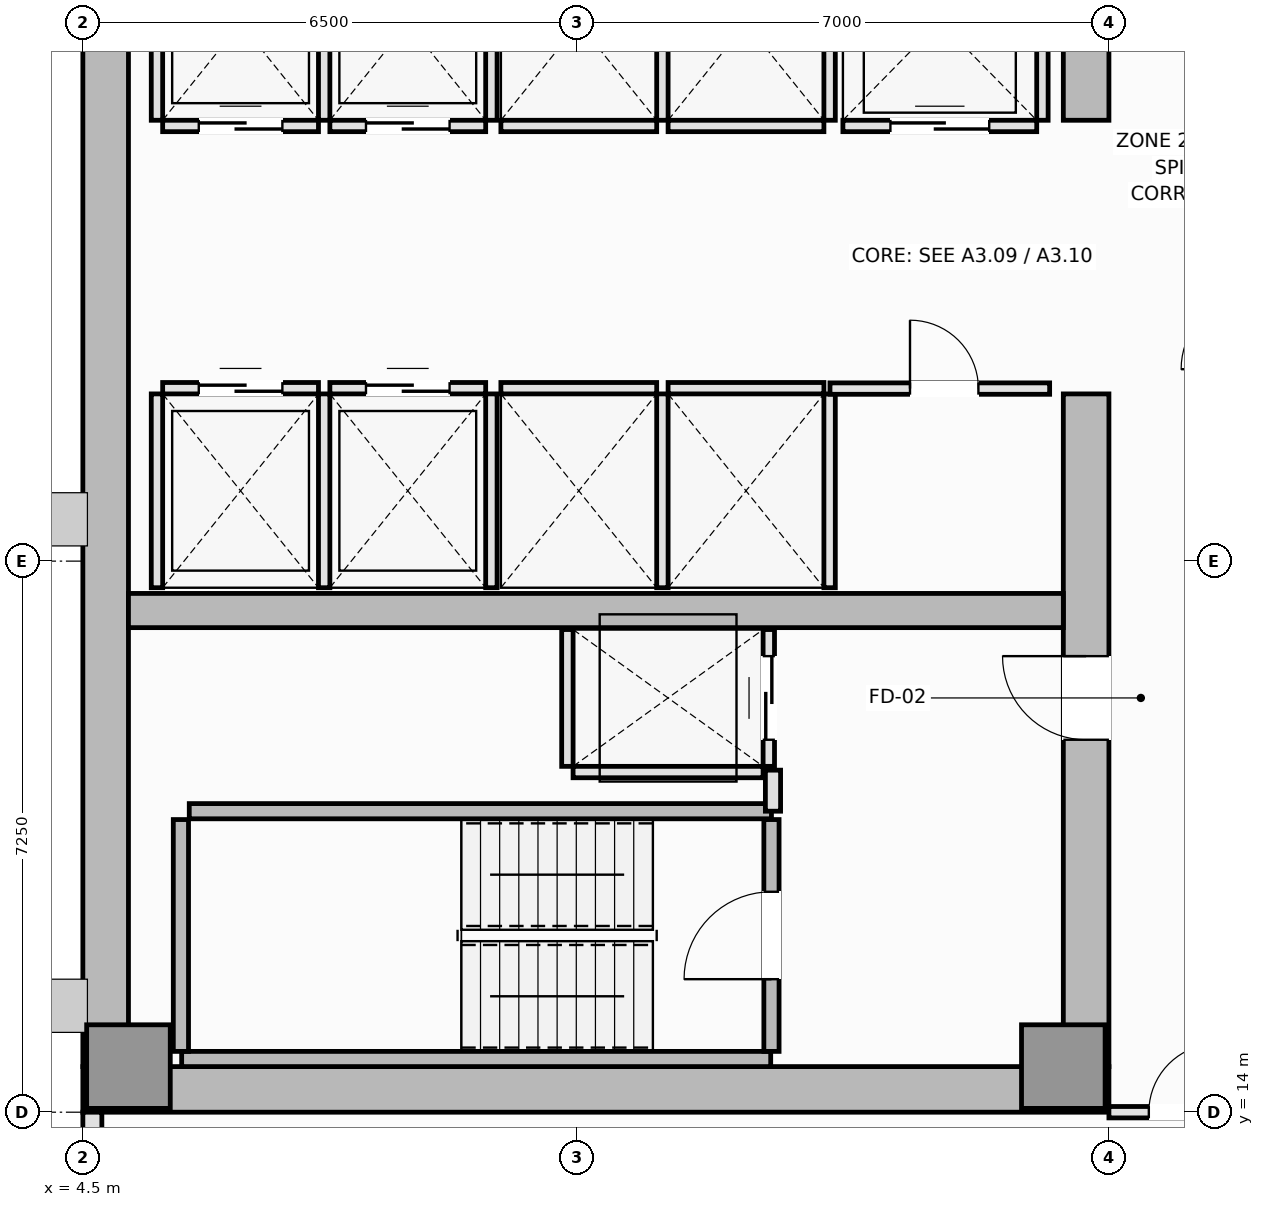
"""IFC4 building model, lengths in metres.
Left out: names, types, materials, properties, quantities, classifications, styles, units other than length and angle.
Written with IfcOpenShell. Run it as: python <this file> out.ifc"""

import sys

from ifc_helpers import new_model, si_unit, direction, frame, frame_2d, origin, origin_2d, place, context, subcontext, project, spatial, rectangle, extrude, element, fill, save


model = new_model("IFC4")
c1 = context("Model", 3, precision=1e-05, world=origin(), true_north=direction((0.0, 1.0)))
c2 = subcontext(c1, "Body", "Model", "MODEL_VIEW")
j1 = project(units=[si_unit("LENGTHUNIT", "METRE"), si_unit("PLANEANGLEUNIT", "RADIAN")], contexts=[c1])
p1 = place(None, origin())
s1 = spatial("IfcSite", under=j1, at=p1, CompositionType="ELEMENT")
p2 = place(p1, origin())
s2 = spatial("IfcBuilding", under=s1, at=p2, CompositionType="ELEMENT")
p3 = place(p2, frame((0.0, 0.0, 148.4)))
s3 = spatial("IfcBuildingStorey", under=s2, at=p3, CompositionType="ELEMENT", Elevation=148.4)
p4 = place(p3, frame((4.5, 14.3, 0.0), z_axis=(0.0, 0.0, 1.0), x_axis=(1.0, 0.0, 0.0)))
e1 = element("IfcWall", 1, at=p4, inside=s3, PredefinedType="SHEAR", context=c2, shape_type="SweptSolid", body=[
    extrude(rectangle(XDim=13.5, YDim=0.6, at=frame_2d((6.75, 0.0))), origin(), (0.0, 0.0, 1.0), 3.55),
])
p5 = place(p3, frame((4.8, 14.6, 0.0), z_axis=(0.0, 0.0, 1.0), x_axis=(0.0, 1.0, 0.0)))
e2 = element("IfcWall", 2, at=p5, inside=s3, PredefinedType="SHEAR", context=c2, shape_type="SweptSolid", body=[
    extrude(rectangle(XDim=21.3, YDim=0.6, at=frame_2d((10.65, 0.0))), origin(), (0.0, 0.0, 1.0), 3.55),
])
p6 = place(p3, frame((17.7, 14.6, 0.0), z_axis=(0.0, 0.0, 1.0), x_axis=(0.0, 1.0, 0.0)))
e3 = element("IfcWall", 3, at=p6, inside=s3, PredefinedType="SHEAR", context=c2, shape_type="SweptSolid", body=[
    extrude(rectangle(XDim=8.85, YDim=0.6, at=frame_2d((4.425, 0.0))), origin(), (0.0, 0.0, 1.0), 3.55),
])
p7 = place(p6, frame((4.3, 0.0, 0.0)))
e4 = element("IfcOpeningElement", 4, at=p7, cuts=e3, PredefinedType="OPENING", context=c2, shape_type="SweptSolid", body=[
    extrude(rectangle(XDim=1.1, YDim=2.15, at=frame_2d((0.55, 1.075))), frame((0.0, 0.31, 0.0), z_axis=(0.0, -1.0, 0.0), x_axis=(1.0, 0.0, 0.0)), (0.0, 0.0, 1.0), 0.62),
])
p8 = place(p3, frame((17.7, 27.05, 0.0), z_axis=(0.0, 0.0, 1.0), x_axis=(0.0, 1.0, 0.0)))
e5 = element("IfcWall", 5, at=p8, inside=s3, PredefinedType="SHEAR", context=c2, shape_type="SweptSolid", body=[
    extrude(rectangle(XDim=8.85, YDim=0.6, at=frame_2d((4.425, 0.0))), origin(), (0.0, 0.0, 1.0), 3.55),
])
p9 = place(p8, frame((3.45, 0.0, 0.0)))
e6 = element("IfcOpeningElement", 6, at=p9, cuts=e5, PredefinedType="OPENING", context=c2, shape_type="SweptSolid", body=[
    extrude(rectangle(XDim=1.1, YDim=2.15, at=frame_2d((0.55, 1.075))), frame((0.0, 0.31, 0.0), z_axis=(0.0, -1.0, 0.0), x_axis=(1.0, 0.0, 0.0)), (0.0, 0.0, 1.0), 0.62),
])
p10 = place(p3, frame((5.1, 20.6, 0.0), z_axis=(0.0, 0.0, 1.0), x_axis=(1.0, 0.0, 0.0)))
e7 = element("IfcWall", 7, at=p10, inside=s3, PredefinedType="SHEAR", context=c2, shape_type="SweptSolid", body=[
    extrude(rectangle(XDim=12.3, YDim=0.45, at=frame_2d((6.15, 0.0))), origin(), (0.0, 0.0, 1.0), 3.55),
])
for number, where, z_axis, x_axis in (
    (8, (5.1, 14.6, 0.0), (0.0, 0.0, 1.0), (1.0, 0.0, 0.0)),
    (9, (17.4, 14.6, 0.0), (0.0, 0.0, 1.0), (1.0, 0.0, 0.0)),
):
    element("IfcColumn", number, at=place(p3, frame(where, z_axis=z_axis, x_axis=x_axis)), inside=s3, PredefinedType="PILASTER", context=c2, shape_type="SweptSolid", body=[
        extrude(rectangle(XDim=1.1, YDim=1.1, at=origin_2d()), origin(), (0.0, 0.0, 1.0), 3.55),
    ])
p11 = place(p3, frame((4.625, 14.0, 0.0), z_axis=(0.0, 0.0, 1.0), x_axis=(0.0, -1.0, 0.0)))
e10 = element("IfcWall", 10, at=p11, inside=s3, PredefinedType="SOLIDWALL", context=c2, shape_type="SweptSolid", body=[
    extrude(rectangle(XDim=6.0, YDim=0.25, at=frame_2d((3.0, 0.0))), origin(), (0.0, 0.0, 1.0), 3.37),
])
p12 = place(p11, frame((1.9, 0.0, 0.9)))
e11 = element("IfcOpeningElement", 11, at=p12, cuts=e10, PredefinedType="OPENING", context=c2, shape_type="SweptSolid", body=[
    extrude(rectangle(XDim=2.2, YDim=1.8, at=frame_2d((1.1, 0.9))), frame((0.0, 0.135, 0.0), z_axis=(0.0, -1.0, 0.0), x_axis=(1.0, 0.0, 0.0)), (0.0, 0.0, 1.0), 0.27),
])
p13 = place(p3, frame((5.8, 14.7, 0.0), z_axis=(0.0, 0.0, 1.0), x_axis=(1.0, 0.0, 0.0)))
e12 = element("IfcWall", 12, at=p13, inside=s3, PredefinedType="SOLIDWALL", context=c2, shape_type="SweptSolid", body=[
    extrude(rectangle(XDim=7.75, YDim=0.2, at=frame_2d((3.875, 0.0))), origin(), (0.0, 0.0, 1.0), 3.55),
])
p14 = place(p3, frame((5.79, 14.8, 0.0), z_axis=(0.0, 0.0, 1.0), x_axis=(0.0, 1.0, 0.0)))
e13 = element("IfcWall", 13, at=p14, inside=s3, PredefinedType="SOLIDWALL", context=c2, shape_type="SweptSolid", body=[
    extrude(rectangle(XDim=3.05, YDim=0.2, at=frame_2d((1.525, 0.0))), origin(), (0.0, 0.0, 1.0), 3.55),
])
p15 = place(p3, frame((5.9, 17.96, 0.0), z_axis=(0.0, 0.0, 1.0), x_axis=(1.0, 0.0, 0.0)))
e14 = element("IfcWall", 14, at=p15, inside=s3, PredefinedType="SOLIDWALL", context=c2, shape_type="SweptSolid", body=[
    extrude(rectangle(XDim=7.66, YDim=0.2, at=frame_2d((3.83, 0.0))), origin(), (0.0, 0.0, 1.0), 3.55),
])
p16 = place(p3, frame((13.56, 14.8, 0.0), z_axis=(0.0, 0.0, 1.0), x_axis=(0.0, 1.0, 0.0)))
e15 = element("IfcWall", 15, at=p16, inside=s3, PredefinedType="SOLIDWALL", context=c2, shape_type="SweptSolid", body=[
    extrude(rectangle(XDim=3.05, YDim=0.2, at=frame_2d((1.525, 0.0))), origin(), (0.0, 0.0, 1.0), 3.55),
])
p17 = place(p16, frame((0.95, 0.0, 0.0)))
e16 = element("IfcOpeningElement", 16, at=p17, cuts=e15, PredefinedType="OPENING", context=c2, shape_type="SweptSolid", body=[
    extrude(rectangle(XDim=1.15, YDim=2.15, at=frame_2d((0.575, 1.075))), frame((0.0, 0.11, 0.0), z_axis=(0.0, -1.0, 0.0), x_axis=(1.0, 0.0, 0.0)), (0.0, 0.0, 1.0), 0.22),
])
p18 = place(p3, frame((5.55, 23.525, 0.0), z_axis=(0.0, 0.0, 1.0), x_axis=(1.0, 0.0, 0.0)))
e17 = element("IfcWall", 17, at=p18, inside=s3, PredefinedType="PARTITIONING", context=c2, shape_type="SweptSolid", body=[
    extrude(rectangle(XDim=2.05, YDim=0.15, at=frame_2d((1.025, 0.0))), origin(), (0.0, 0.0, 1.0), 3.37),
])
p19 = place(p18, frame((0.475, 0.0, 0.0)))
e18 = element("IfcOpeningElement", 18, at=p19, cuts=e17, PredefinedType="OPENING", context=c2, shape_type="SweptSolid", body=[
    extrude(rectangle(XDim=1.1, YDim=2.2, at=frame_2d((0.55, 1.1))), frame((0.0, 0.085, 0.0), z_axis=(0.0, -1.0, 0.0), x_axis=(1.0, 0.0, 0.0)), (0.0, 0.0, 1.0), 0.17),
])
for number, where, z_axis, x_axis in (
    (19, (5.475, 20.9, 0.0), (0.0, 0.0, 1.0), (0.0, 1.0, 0.0)),
    (20, (7.675, 20.9, 0.0), (0.0, 0.0, 1.0), (0.0, 1.0, 0.0)),
):
    element("IfcWall", number, at=place(p3, frame(where, z_axis=z_axis, x_axis=x_axis)), inside=s3, PredefinedType="PARTITIONING", context=c2, shape_type="SweptSolid", body=[
        extrude(rectangle(XDim=2.55, YDim=0.15, at=frame_2d((1.275, 0.0))), origin(), (0.0, 0.0, 1.0), 3.37),
    ])
p20 = place(p3, frame((7.75, 23.525, 0.0), z_axis=(0.0, 0.0, 1.0), x_axis=(1.0, 0.0, 0.0)))
e21 = element("IfcWall", 21, at=p20, inside=s3, PredefinedType="PARTITIONING", context=c2, shape_type="SweptSolid", body=[
    extrude(rectangle(XDim=2.05, YDim=0.15, at=frame_2d((1.025, 0.0))), origin(), (0.0, 0.0, 1.0), 3.37),
])
p21 = place(p20, frame((0.475, 0.0, 0.0)))
e22 = element("IfcOpeningElement", 22, at=p21, cuts=e21, PredefinedType="OPENING", context=c2, shape_type="SweptSolid", body=[
    extrude(rectangle(XDim=1.1, YDim=2.2, at=frame_2d((0.55, 1.1))), frame((0.0, 0.085, 0.0), z_axis=(0.0, -1.0, 0.0), x_axis=(1.0, 0.0, 0.0)), (0.0, 0.0, 1.0), 0.17),
])
p22 = place(p3, frame((9.875, 20.9, 0.0), z_axis=(0.0, 0.0, 1.0), x_axis=(0.0, 1.0, 0.0)))
e23 = element("IfcWall", 23, at=p22, inside=s3, PredefinedType="PARTITIONING", context=c2, shape_type="SweptSolid", body=[
    extrude(rectangle(XDim=2.55, YDim=0.15, at=frame_2d((1.275, 0.0))), origin(), (0.0, 0.0, 1.0), 3.37),
])
p23 = place(p3, frame((5.55, 26.975, 0.0), z_axis=(0.0, 0.0, 1.0), x_axis=(1.0, 0.0, 0.0)))
e24 = element("IfcWall", 24, at=p23, inside=s3, PredefinedType="PARTITIONING", context=c2, shape_type="SweptSolid", body=[
    extrude(rectangle(XDim=2.05, YDim=0.15, at=frame_2d((1.025, 0.0))), origin(), (0.0, 0.0, 1.0), 3.37),
])
p24 = place(p23, frame((0.475, 0.0, 0.0)))
e25 = element("IfcOpeningElement", 25, at=p24, cuts=e24, PredefinedType="OPENING", context=c2, shape_type="SweptSolid", body=[
    extrude(rectangle(XDim=1.1, YDim=2.2, at=frame_2d((0.55, 1.1))), frame((0.0, 0.085, 0.0), z_axis=(0.0, -1.0, 0.0), x_axis=(1.0, 0.0, 0.0)), (0.0, 0.0, 1.0), 0.17),
])
for number, where, z_axis, x_axis in (
    (26, (5.475, 27.05, 0.0), (0.0, 0.0, 1.0), (0.0, 1.0, 0.0)),
    (27, (7.675, 27.05, 0.0), (0.0, 0.0, 1.0), (0.0, 1.0, 0.0)),
):
    element("IfcWall", number, at=place(p3, frame(where, z_axis=z_axis, x_axis=x_axis)), inside=s3, PredefinedType="PARTITIONING", context=c2, shape_type="SweptSolid", body=[
        extrude(rectangle(XDim=2.55, YDim=0.15, at=frame_2d((1.275, 0.0))), origin(), (0.0, 0.0, 1.0), 3.37),
    ])
p25 = place(p3, frame((7.75, 26.975, 0.0), z_axis=(0.0, 0.0, 1.0), x_axis=(1.0, 0.0, 0.0)))
e28 = element("IfcWall", 28, at=p25, inside=s3, PredefinedType="PARTITIONING", context=c2, shape_type="SweptSolid", body=[
    extrude(rectangle(XDim=2.05, YDim=0.15, at=frame_2d((1.025, 0.0))), origin(), (0.0, 0.0, 1.0), 3.37),
])
p26 = place(p25, frame((0.475, 0.0, 0.0)))
e29 = element("IfcOpeningElement", 29, at=p26, cuts=e28, PredefinedType="OPENING", context=c2, shape_type="SweptSolid", body=[
    extrude(rectangle(XDim=1.1, YDim=2.2, at=frame_2d((0.55, 1.1))), frame((0.0, 0.085, 0.0), z_axis=(0.0, -1.0, 0.0), x_axis=(1.0, 0.0, 0.0)), (0.0, 0.0, 1.0), 0.17),
])
p27 = place(p3, frame((9.875, 27.05, 0.0), z_axis=(0.0, 0.0, 1.0), x_axis=(0.0, 1.0, 0.0)))
e30 = element("IfcWall", 30, at=p27, inside=s3, PredefinedType="PARTITIONING", context=c2, shape_type="SweptSolid", body=[
    extrude(rectangle(XDim=2.55, YDim=0.15, at=frame_2d((1.275, 0.0))), origin(), (0.0, 0.0, 1.0), 3.37),
])
p28 = place(p3, frame((10.0, 23.525, 0.0), z_axis=(0.0, 0.0, 1.0), x_axis=(1.0, 0.0, 0.0)))
e31 = element("IfcWall", 31, at=p28, inside=s3, PredefinedType="PARTITIONING", context=c2, shape_type="SweptSolid", body=[
    extrude(rectangle(XDim=2.05, YDim=0.15, at=frame_2d((1.025, 0.0))), origin(), (0.0, 0.0, 1.0), 3.37),
])
p29 = place(p3, frame((12.125, 20.9, 0.0), z_axis=(0.0, 0.0, 1.0), x_axis=(0.0, 1.0, 0.0)))
e32 = element("IfcWall", 32, at=p29, inside=s3, PredefinedType="PARTITIONING", context=c2, shape_type="SweptSolid", body=[
    extrude(rectangle(XDim=2.55, YDim=0.15, at=frame_2d((1.275, 0.0))), origin(), (0.0, 0.0, 1.0), 3.37),
])
p30 = place(p3, frame((12.2, 23.525, 0.0), z_axis=(0.0, 0.0, 1.0), x_axis=(1.0, 0.0, 0.0)))
e33 = element("IfcWall", 33, at=p30, inside=s3, PredefinedType="PARTITIONING", context=c2, shape_type="SweptSolid", body=[
    extrude(rectangle(XDim=2.05, YDim=0.15, at=frame_2d((1.025, 0.0))), origin(), (0.0, 0.0, 1.0), 3.37),
])
p31 = place(p3, frame((14.325, 20.9, 0.0), z_axis=(0.0, 0.0, 1.0), x_axis=(0.0, 1.0, 0.0)))
e34 = element("IfcWall", 34, at=p31, inside=s3, PredefinedType="PARTITIONING", context=c2, shape_type="SweptSolid", body=[
    extrude(rectangle(XDim=2.55, YDim=0.15, at=frame_2d((1.275, 0.0))), origin(), (0.0, 0.0, 1.0), 3.37),
])
p32 = place(p3, frame((10.0, 26.975, 0.0), z_axis=(0.0, 0.0, 1.0), x_axis=(1.0, 0.0, 0.0)))
e35 = element("IfcWall", 35, at=p32, inside=s3, PredefinedType="PARTITIONING", context=c2, shape_type="SweptSolid", body=[
    extrude(rectangle(XDim=2.05, YDim=0.15, at=frame_2d((1.025, 0.0))), origin(), (0.0, 0.0, 1.0), 3.37),
])
p33 = place(p3, frame((12.125, 27.05, 0.0), z_axis=(0.0, 0.0, 1.0), x_axis=(0.0, 1.0, 0.0)))
e36 = element("IfcWall", 36, at=p33, inside=s3, PredefinedType="PARTITIONING", context=c2, shape_type="SweptSolid", body=[
    extrude(rectangle(XDim=2.55, YDim=0.15, at=frame_2d((1.275, 0.0))), origin(), (0.0, 0.0, 1.0), 3.37),
])
p34 = place(p3, frame((12.2, 26.975, 0.0), z_axis=(0.0, 0.0, 1.0), x_axis=(1.0, 0.0, 0.0)))
e37 = element("IfcWall", 37, at=p34, inside=s3, PredefinedType="PARTITIONING", context=c2, shape_type="SweptSolid", body=[
    extrude(rectangle(XDim=2.05, YDim=0.15, at=frame_2d((1.025, 0.0))), origin(), (0.0, 0.0, 1.0), 3.37),
])
p35 = place(p3, frame((14.325, 27.05, 0.0), z_axis=(0.0, 0.0, 1.0), x_axis=(0.0, 1.0, 0.0)))
e38 = element("IfcWall", 38, at=p35, inside=s3, PredefinedType="PARTITIONING", context=c2, shape_type="SweptSolid", body=[
    extrude(rectangle(XDim=2.55, YDim=0.15, at=frame_2d((1.275, 0.0))), origin(), (0.0, 0.0, 1.0), 3.37),
])
p36 = place(p3, frame((14.5, 26.975, 0.0), z_axis=(0.0, 0.0, 1.0), x_axis=(1.0, 0.0, 0.0)))
e39 = element("IfcWall", 39, at=p36, inside=s3, PredefinedType="PARTITIONING", context=c2, shape_type="SweptSolid", body=[
    extrude(rectangle(XDim=2.55, YDim=0.15, at=frame_2d((1.275, 0.0))), origin(), (0.0, 0.0, 1.0), 3.37),
])
p37 = place(p36, frame((0.625, 0.0, 0.0)))
e40 = element("IfcOpeningElement", 40, at=p37, cuts=e39, PredefinedType="OPENING", context=c2, shape_type="SweptSolid", body=[
    extrude(rectangle(XDim=1.3, YDim=2.2, at=frame_2d((0.65, 1.1))), frame((0.0, 0.085, 0.0), z_axis=(0.0, -1.0, 0.0), x_axis=(1.0, 0.0, 0.0)), (0.0, 0.0, 1.0), 0.17),
])
p38 = place(p3, frame((17.125, 27.05, 0.0), z_axis=(0.0, 0.0, 1.0), x_axis=(0.0, 1.0, 0.0)))
e41 = element("IfcWall", 41, at=p38, inside=s3, PredefinedType="PARTITIONING", context=c2, shape_type="SweptSolid", body=[
    extrude(rectangle(XDim=2.6, YDim=0.15, at=frame_2d((1.3, 0.0))), origin(), (0.0, 0.0, 1.0), 3.37),
])
p39 = place(p3, frame((10.95, 18.475, 0.0), z_axis=(0.0, 0.0, 1.0), x_axis=(1.0, 0.0, 0.0)))
e42 = element("IfcWall", 42, at=p39, inside=s3, PredefinedType="PARTITIONING", context=c2, shape_type="SweptSolid", body=[
    extrude(rectangle(XDim=2.5, YDim=0.15, at=frame_2d((1.25, 0.0))), origin(), (0.0, 0.0, 1.0), 3.37),
])
p40 = place(p3, frame((10.875, 18.55, 0.0), z_axis=(0.0, 0.0, 1.0), x_axis=(0.0, 1.0, 0.0)))
e43 = element("IfcWall", 43, at=p40, inside=s3, PredefinedType="PARTITIONING", context=c2, shape_type="SweptSolid", body=[
    extrude(rectangle(XDim=1.8, YDim=0.15, at=frame_2d((0.9, 0.0))), origin(), (0.0, 0.0, 1.0), 3.37),
])
p41 = place(p3, frame((13.525, 18.55, 0.0), z_axis=(0.0, 0.0, 1.0), x_axis=(0.0, 1.0, 0.0)))
e44 = element("IfcWall", 44, at=p41, inside=s3, PredefinedType="PARTITIONING", context=c2, shape_type="SweptSolid", body=[
    extrude(rectangle(XDim=1.8, YDim=0.15, at=frame_2d((0.9, 0.0))), origin(), (0.0, 0.0, 1.0), 3.37),
])
p42 = place(p41, frame((0.35, 0.0, 0.0)))
e45 = element("IfcOpeningElement", 45, at=p42, cuts=e44, PredefinedType="OPENING", context=c2, shape_type="SweptSolid", body=[
    extrude(rectangle(XDim=1.1, YDim=2.2, at=frame_2d((0.55, 1.1))), frame((0.0, 0.085, 0.0), z_axis=(0.0, -1.0, 0.0), x_axis=(1.0, 0.0, 0.0)), (0.0, 0.0, 1.0), 0.17),
])
p43 = place(p3, frame((13.58, 17.96, 0.0), z_axis=(0.0, 0.0, 1.0), x_axis=(0.0, 1.0, 0.0)))
e46 = element("IfcWall", 46, at=p43, inside=s3, PredefinedType="PARTITIONING", context=c2, shape_type="SweptSolid", body=[
    extrude(rectangle(XDim=0.54, YDim=0.2, at=frame_2d((0.27, 0.0))), origin(), (0.0, 0.0, 1.0), 3.37),
])
p44 = place(p3, frame((14.33, 23.52, 0.0), z_axis=(0.0, 0.0, 1.0), x_axis=(1.0, 0.0, 0.0)))
e47 = element("IfcWall", 47, at=p44, inside=s3, PredefinedType="PARTITIONING", context=c2, shape_type="SweptSolid", body=[
    extrude(rectangle(XDim=2.89, YDim=0.15, at=frame_2d((1.445, 0.0))), origin(), (0.0, 0.0, 1.0), 3.37),
])
p45 = place(p44, frame((1.053, 0.0, 0.0)))
e48 = element("IfcOpeningElement", 48, at=p45, cuts=e47, PredefinedType="OPENING", context=c2, shape_type="SweptSolid", body=[
    extrude(rectangle(XDim=0.9, YDim=2.1, at=frame_2d((0.45, 1.05))), frame((0.0, 0.085, 0.0), z_axis=(0.0, -1.0, 0.0), x_axis=(1.0, 0.0, 0.0)), (0.0, 0.0, 1.0), 0.17),
])
p46 = place(p3, frame((18.0, 14.0, 0.0), z_axis=(0.0, 0.0, 1.0), x_axis=(1.0, 0.0, 0.0)))
e49 = element("IfcWall", 49, at=p46, inside=s3, PredefinedType="PARTITIONING", context=c2, shape_type="SweptSolid", body=[
    extrude(rectangle(XDim=1.95, YDim=0.15, at=frame_2d((0.975, 0.0))), origin(), (0.0, 0.0, 1.0), 3.37),
])
p47 = place(p46, frame((0.525, 0.0, 0.0)))
e50 = element("IfcOpeningElement", 50, at=p47, cuts=e49, PredefinedType="OPENING", context=c2, shape_type="SweptSolid", body=[
    extrude(rectangle(XDim=0.9, YDim=2.1, at=frame_2d((0.45, 1.05))), frame((0.0, 0.085, 0.0), z_axis=(0.0, -1.0, 0.0), x_axis=(1.0, 0.0, 0.0)), (0.0, 0.0, 1.0), 0.17),
])
p48 = place(p17, origin())
e51 = element("IfcDoor", 51, at=p48, inside=s3, OperationType="SINGLE_SWING_LEFT", PredefinedType="DOOR", context=c2, shape_type="SweptSolid", body=[
    extrude(rectangle(XDim=1.15, YDim=2.15, at=frame_2d((0.575, 1.075))), frame((0.0, 0.025, 0.0), z_axis=(0.0, -1.0, 0.0), x_axis=(1.0, 0.0, 0.0)), (0.0, 0.0, 1.0), 0.05),
])
fill(e16, e51)
p49 = place(p19, origin())
e52 = element("IfcDoor", 52, at=p49, inside=s3, OperationType="DOUBLE_DOOR_SLIDING", PredefinedType="DOOR", context=c2, shape_type="SweptSolid", body=[
    extrude(rectangle(XDim=1.1, YDim=2.2, at=frame_2d((0.55, 1.1))), frame((0.0, 0.025, 0.0), z_axis=(0.0, -1.0, 0.0), x_axis=(1.0, 0.0, 0.0)), (0.0, 0.0, 1.0), 0.05),
])
fill(e18, e52)
p50 = place(p21, origin())
e53 = element("IfcDoor", 53, at=p50, inside=s3, OperationType="DOUBLE_DOOR_SLIDING", PredefinedType="DOOR", context=c2, shape_type="SweptSolid", body=[
    extrude(rectangle(XDim=1.1, YDim=2.2, at=frame_2d((0.55, 1.1))), frame((0.0, 0.025, 0.0), z_axis=(0.0, -1.0, 0.0), x_axis=(1.0, 0.0, 0.0)), (0.0, 0.0, 1.0), 0.05),
])
fill(e22, e53)
p51 = place(p24, origin())
e54 = element("IfcDoor", 54, at=p51, inside=s3, OperationType="DOUBLE_DOOR_SLIDING", PredefinedType="DOOR", context=c2, shape_type="SweptSolid", body=[
    extrude(rectangle(XDim=1.1, YDim=2.2, at=frame_2d((0.55, 1.1))), frame((0.0, 0.025, 0.0), z_axis=(0.0, -1.0, 0.0), x_axis=(1.0, 0.0, 0.0)), (0.0, 0.0, 1.0), 0.05),
])
fill(e25, e54)
p52 = place(p26, origin())
e55 = element("IfcDoor", 55, at=p52, inside=s3, OperationType="DOUBLE_DOOR_SLIDING", PredefinedType="DOOR", context=c2, shape_type="SweptSolid", body=[
    extrude(rectangle(XDim=1.1, YDim=2.2, at=frame_2d((0.55, 1.1))), frame((0.0, 0.025, 0.0), z_axis=(0.0, -1.0, 0.0), x_axis=(1.0, 0.0, 0.0)), (0.0, 0.0, 1.0), 0.05),
])
fill(e29, e55)
p53 = place(p37, origin())
e56 = element("IfcDoor", 56, at=p53, inside=s3, OperationType="DOUBLE_DOOR_SLIDING", PredefinedType="DOOR", context=c2, shape_type="SweptSolid", body=[
    extrude(rectangle(XDim=1.3, YDim=2.2, at=frame_2d((0.65, 1.1))), frame((0.0, 0.025, 0.0), z_axis=(0.0, -1.0, 0.0), x_axis=(1.0, 0.0, 0.0)), (0.0, 0.0, 1.0), 0.05),
])
fill(e40, e56)
p54 = place(p42, origin())
e57 = element("IfcDoor", 57, at=p54, inside=s3, OperationType="DOUBLE_DOOR_SLIDING", PredefinedType="DOOR", context=c2, shape_type="SweptSolid", body=[
    extrude(rectangle(XDim=1.1, YDim=2.2, at=frame_2d((0.55, 1.1))), frame((0.0, 0.025, 0.0), z_axis=(0.0, -1.0, 0.0), x_axis=(1.0, 0.0, 0.0)), (0.0, 0.0, 1.0), 0.05),
])
fill(e45, e57)
p55 = place(p7, origin())
e58 = element("IfcDoor", 58, at=p55, inside=s3, OperationType="SINGLE_SWING_RIGHT", PredefinedType="DOOR", context=c2, shape_type="SweptSolid", body=[
    extrude(rectangle(XDim=1.1, YDim=2.15, at=frame_2d((0.55, 1.075))), frame((0.0, 0.025, 0.0), z_axis=(0.0, -1.0, 0.0), x_axis=(1.0, 0.0, 0.0)), (0.0, 0.0, 1.0), 0.05),
])
fill(e4, e58)
p56 = place(p45, origin())
e59 = element("IfcDoor", 59, at=p56, inside=s3, OperationType="SINGLE_SWING_LEFT", PredefinedType="DOOR", context=c2, shape_type="SweptSolid", body=[
    extrude(rectangle(XDim=0.9, YDim=2.1, at=frame_2d((0.45, 1.05))), frame((0.0, 0.025, 0.0), z_axis=(0.0, -1.0, 0.0), x_axis=(1.0, 0.0, 0.0)), (0.0, 0.0, 1.0), 0.05),
])
fill(e48, e59)
p57 = place(p47, origin())
e60 = element("IfcDoor", 60, at=p57, inside=s3, OperationType="SINGLE_SWING_RIGHT", PredefinedType="DOOR", context=c2, shape_type="SweptSolid", body=[
    extrude(rectangle(XDim=0.9, YDim=2.1, at=frame_2d((0.45, 1.05))), frame((0.0, 0.025, 0.0), z_axis=(0.0, -1.0, 0.0), x_axis=(1.0, 0.0, 0.0)), (0.0, 0.0, 1.0), 0.05),
])
fill(e50, e60)
save(model, sys.argv[1])
